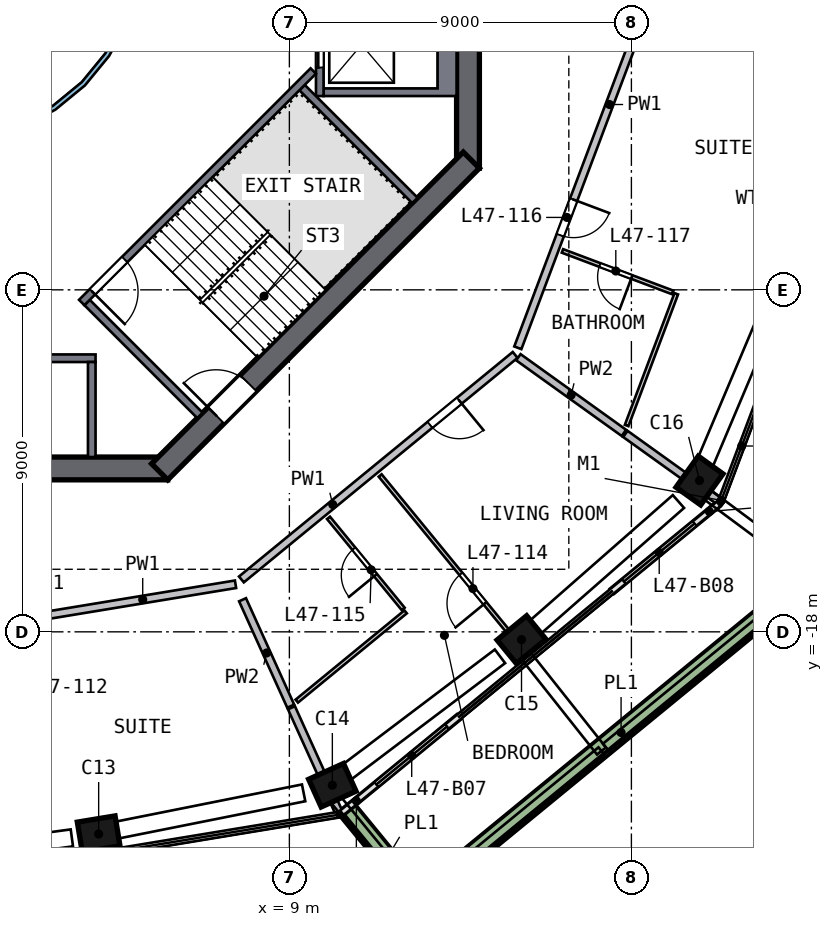
"""IFC4 building model, lengths in metres.
Left out: names, types, materials, properties, quantities, classifications, styles, units other than length and angle.
Written with IfcOpenShell. Run it as: python <this file> out.ifc"""

import sys

from ifc_helpers import new_model, si_unit, direction, frame, frame_2d, origin, origin_2d, place, context, subcontext, project, spatial, polyline, rectangle, outline, extrude, element, fill, save


model = new_model("IFC4")
c1 = context("Model", 3, precision=1e-05, world=origin(), true_north=direction((0.0, 1.0)))
c2 = subcontext(c1, "Body", "Model", "MODEL_VIEW")
j1 = project(units=[si_unit("LENGTHUNIT", "METRE"), si_unit("PLANEANGLEUNIT", "RADIAN")], contexts=[c1])
p1 = place(None, origin())
s1 = spatial("IfcSite", under=j1, at=p1, CompositionType="ELEMENT")
p2 = place(p1, origin())
s2 = spatial("IfcBuilding", under=s1, at=p2, CompositionType="ELEMENT")
p3 = place(p2, frame((0.0, 0.0, 194.0)))
s3 = spatial("IfcBuildingStorey", under=s2, at=p3, CompositionType="ELEMENT", Elevation=194.0)
p4 = place(p3, frame((3.848, -23.343, 0.0), z_axis=(0.110878491, 0.019240232, 0.993647711), x_axis=(0.980424155, 0.161570885, -0.112531444)))
e1 = element("IfcColumn", 1, at=p4, inside=s3, PredefinedType="COLUMN", context=c2, shape_type="SweptSolid", body=[
    extrude(rectangle(XDim=1.0, YDim=0.8, at=origin_2d()), origin(), (0.0, 0.0, 1.0), 3.21),
])
p5 = place(p3, frame((10.004, -22.095, 0.0), z_axis=(0.104684253, 0.048502944, 0.993322038), x_axis=(-0.904795347, -0.409920721, 0.115370627)))
e2 = element("IfcColumn", 2, at=p5, inside=s3, PredefinedType="COLUMN", context=c2, shape_type="SweptSolid", body=[
    extrude(rectangle(XDim=1.0, YDim=0.8, at=origin_2d()), origin(), (0.0, 0.0, 1.0), 3.211),
])
p6 = place(p3, frame((15.004, -18.292, 0.0), z_axis=(0.086391066, 0.072093953, 0.993649357), x_axis=(0.768277159, 0.630150897, -0.112516907)))
e3 = element("IfcColumn", 3, at=p6, inside=s3, PredefinedType="COLUMN", context=c2, shape_type="SweptSolid", body=[
    extrude(rectangle(XDim=1.0, YDim=0.8, at=origin_2d()), origin(), (0.0, 0.0, 1.0), 3.21),
])
p7 = place(p3, frame((19.712, -14.133, 0.0), z_axis=(0.066444321, 0.094344854, 0.993319788), x_axis=(-0.578831594, -0.807241683, 0.11539)))
e4 = element("IfcColumn", 4, at=p7, inside=s3, PredefinedType="COLUMN", context=c2, shape_type="SweptSolid", body=[
    extrude(rectangle(XDim=1.0, YDim=0.8, at=origin_2d()), origin(), (0.0, 0.0, 1.0), 3.211),
])
p8 = place(p3, frame((13.7, -5.799, 0.0), z_axis=(0.0, 0.0, 1.0), x_axis=(0.0, 1.0, 0.0)))
e5 = element("IfcWall", 5, at=p8, inside=s3, PredefinedType="SHEAR", context=c2, shape_type="SweptSolid", body=[
    extrude(rectangle(XDim=11.598, YDim=0.6, at=frame_2d((5.799, 0.0))), origin(), (0.0, 0.0, 1.0), 3.5),
])
p9 = place(p8, frame((4.899, 0.0, 0.0)))
e6 = element("IfcOpeningElement", 6, at=p9, cuts=e5, PredefinedType="OPENING", context=c2, shape_type="SweptSolid", body=[
    extrude(rectangle(XDim=1.8, YDim=2.1, at=frame_2d((0.9, 1.05))), frame((0.0, 0.31, 0.0), z_axis=(0.0, -1.0, 0.0), x_axis=(1.0, 0.0, 0.0)), (0.0, 0.0, 1.0), 0.62),
])
p10 = place(p3, frame((-5.799, -13.7, 0.0), z_axis=(0.0, 0.0, 1.0), x_axis=(1.0, 0.0, 0.0)))
e7 = element("IfcWall", 7, at=p10, inside=s3, PredefinedType="SHEAR", context=c2, shape_type="SweptSolid", body=[
    extrude(rectangle(XDim=11.598, YDim=0.6, at=frame_2d((5.799, 0.0))), origin(), (0.0, 0.0, 1.0), 3.5),
])
p11 = place(p3, frame((5.587, -13.788, 0.0), z_axis=(0.0, 0.0, 1.0), x_axis=(0.707106781, 0.707106781, 0.0)))
e8 = element("IfcWall", 8, at=p11, inside=s3, PredefinedType="SHEAR", context=c2, shape_type="SweptSolid", body=[
    extrude(rectangle(XDim=11.598, YDim=0.6, at=frame_2d((5.799, 0.0))), origin(), (0.0, 0.0, 1.0), 3.5),
])
p12 = place(p11, frame((2.099, 0.0, 0.0)))
e9 = element("IfcOpeningElement", 9, at=p12, cuts=e8, PredefinedType="OPENING", context=c2, shape_type="SweptSolid", body=[
    extrude(rectangle(XDim=1.2, YDim=2.1, at=frame_2d((0.6, 1.05))), frame((0.0, 0.31, 0.0), z_axis=(0.0, -1.0, 0.0), x_axis=(1.0, 0.0, 0.0)), (0.0, 0.0, 1.0), 0.62),
])
p13 = place(p3, frame((10.389, -22.757, 0.0), z_axis=(0.0, 0.0, 1.0), x_axis=(0.773191746, 0.634172314, 0.0)))
e10 = element("IfcWall", 10, at=p13, inside=s3, PredefinedType="SOLIDWALL", context=c2, shape_type="SweptSolid", body=[
    extrude(rectangle(XDim=3.967, YDim=0.15, at=frame_2d((1.984, 0.0))), origin(), (0.0, 0.0, 1.0), 2.475),
])
p14 = place(p13, frame((1.167, 0.0, 0.0)))
e11 = element("IfcOpeningElement", 11, at=p14, cuts=e10, PredefinedType="OPENING", context=c2, shape_type="SweptSolid", body=[
    extrude(rectangle(XDim=2.4, YDim=2.4, at=frame_2d((1.2, 1.2))), frame((0.0, 0.085, 0.0), z_axis=(0.0, -1.0, 0.0), x_axis=(1.0, 0.0, 0.0)), (0.0, 0.0, 1.0), 0.17),
])
p15 = place(p3, frame((17.495, -16.928, 0.0), z_axis=(0.0, 0.0, 1.0), x_axis=(0.773166937, 0.634202561, 0.0)))
e12 = element("IfcWall", 12, at=p15, inside=s3, PredefinedType="SOLIDWALL", context=c2, shape_type="SweptSolid", body=[
    extrude(rectangle(XDim=3.609, YDim=0.15, at=frame_2d((1.804, 0.0))), origin(), (0.0, 0.0, 1.0), 2.475),
])
p16 = place(p15, frame((0.4, 0.0, 0.0)))
e13 = element("IfcOpeningElement", 13, at=p16, cuts=e12, PredefinedType="OPENING", context=c2, shape_type="SweptSolid", body=[
    extrude(rectangle(XDim=2.4, YDim=2.4, at=frame_2d((1.2, 1.2))), frame((0.0, 0.085, 0.0), z_axis=(0.0, -1.0, 0.0), x_axis=(1.0, 0.0, 0.0)), (0.0, 0.0, 1.0), 0.17),
])
p17 = place(p3, frame((10.553, -22.72, 0.0), z_axis=(0.0, 0.0, 1.0), x_axis=(0.634197315, -0.773171239, 0.0)))
e14 = element("IfcWall", 14, at=p17, inside=s3, PredefinedType="SOLIDWALL", context=c2, shape_type="SweptSolid", body=[
    extrude(rectangle(XDim=3.199, YDim=0.5, at=frame_2d((1.6, 0.0))), origin(), (0.0, 0.0, 1.0), 0.7),
])
p18 = place(p3, frame((12.616, -24.842, 0.0), z_axis=(0.0, 0.0, 1.0), x_axis=(0.773176896, 0.634190419, 0.0)))
e15 = element("IfcWall", 15, at=p18, inside=s3, PredefinedType="SOLIDWALL", context=c2, shape_type="SweptSolid", body=[
    extrude(rectangle(XDim=13.224, YDim=0.5, at=frame_2d((6.612, 0.0))), origin(), (0.0, 0.0, 1.0), 0.7),
])
p19 = place(p3, origin())
e16 = element("IfcWall", 16, at=p19, inside=s3, PredefinedType="SOLIDWALL", context=c2, shape_type="SweptSolid", body=[
    extrude(outline(polyline([(13.4, -3.9), (9.9, -3.9), (9.9, -3.7), (12.9, -3.7), (12.9, -1.4), (9.9, -1.4), (9.9, -1.2), (13.4, -1.2), (13.4, -3.9)])), origin(), (0.0, 0.0, 1.0), 3.19),
])
p20 = place(p3, frame((9.8, -1.2, 0.0), z_axis=(0.0, 0.0, 1.0), x_axis=(0.0, -1.0, 0.0)))
e17 = element("IfcWall", 17, at=p20, inside=s3, PredefinedType="SOLIDWALL", context=c2, shape_type="SweptSolid", body=[
    extrude(rectangle(XDim=2.7, YDim=0.2, at=frame_2d((1.35, 0.0))), origin(), (0.0, 0.0, 1.0), 3.19),
])
p21 = place(p20, frame((0.75, 0.0, 0.0)))
e18 = element("IfcOpeningElement", 18, at=p21, cuts=e17, PredefinedType="OPENING", context=c2, shape_type="SweptSolid", body=[
    extrude(rectangle(XDim=1.2, YDim=2.1, at=frame_2d((0.6, 1.05))), frame((0.0, 0.11, 0.0), z_axis=(0.0, -1.0, 0.0), x_axis=(1.0, 0.0, 0.0)), (0.0, 0.0, 1.0), 0.22),
])
p22 = place(p3, frame((-3.9, -10.8, 0.0), z_axis=(0.0, 0.0, 1.0), x_axis=(1.0, 0.0, 0.0)))
e19 = element("IfcWall", 19, at=p22, inside=s3, PredefinedType="SOLIDWALL", context=c2, shape_type="SweptSolid", body=[
    extrude(rectangle(XDim=7.8, YDim=0.2, at=frame_2d((3.9, 0.0))), origin(), (0.0, 0.0, 1.0), 3.19),
])
p23 = place(p22, frame((3.45, 0.0, 0.0)))
e20 = element("IfcOpeningElement", 20, at=p23, cuts=e19, PredefinedType="OPENING", context=c2, shape_type="SweptSolid", body=[
    extrude(rectangle(XDim=0.9, YDim=2.1, at=frame_2d((0.45, 1.05))), frame((0.0, 0.11, 0.0), z_axis=(0.0, -1.0, 0.0), x_axis=(1.0, 0.0, 0.0)), (0.0, 0.0, 1.0), 0.22),
])
p24 = place(p3, frame((3.8, -10.9, 0.0), z_axis=(0.0, 0.0, 1.0), x_axis=(0.0, -1.0, 0.0)))
e21 = element("IfcWall", 21, at=p24, inside=s3, PredefinedType="SOLIDWALL", context=c2, shape_type="SweptSolid", body=[
    extrude(rectangle(XDim=2.5, YDim=0.2, at=frame_2d((1.25, 0.0))), origin(), (0.0, 0.0, 1.0), 3.19),
])
p25 = place(p3, frame((9.629, -3.24, 0.0), z_axis=(0.0, 0.0, 1.0), x_axis=(-0.707120946, -0.707092617, 0.0)))
e22 = element("IfcWall", 22, at=p25, inside=s3, PredefinedType="SOLIDWALL", context=c2, shape_type="SweptSolid", body=[
    extrude(rectangle(XDim=8.618, YDim=0.2, at=frame_2d((4.309, 0.0))), origin(), (0.0, 0.0, 1.0), 3.19),
])
p26 = place(p25, frame((7.018, 0.0, 0.0)))
e23 = element("IfcOpeningElement", 23, at=p26, cuts=e22, PredefinedType="OPENING", context=c2, shape_type="SweptSolid", body=[
    extrude(rectangle(XDim=1.2, YDim=2.1, at=frame_2d((0.6, 1.05))), frame((0.0, 0.11, 0.0), z_axis=(0.0, -1.0, 0.0), x_axis=(1.0, 0.0, 0.0)), (0.0, 0.0, 1.0), 0.22),
])
for number, where, z_axis, x_axis in (
    (24, (3.677, -9.334, 0.0), (0.0, 0.0, 1.0), (0.707, -0.707, 0.0)),
    (25, (9.334, -3.677, 0.0), (0.0, 0.0, 1.0), (0.707, -0.707, 0.0)),
):
    element("IfcWall", number, at=place(p3, frame(where, z_axis=z_axis, x_axis=x_axis)), inside=s3, PredefinedType="SOLIDWALL", context=c2, shape_type="SweptSolid", body=[
        extrude(rectangle(XDim=4.2, YDim=0.2, at=frame_2d((2.1, 0.0))), origin(), (0.0, 0.0, 1.0), 3.19),
    ])
p27 = place(p3, origin())
e26 = element("IfcWall", 26, at=p27, inside=s3, PredefinedType="SOLIDWALL", context=c2, shape_type="SweptSolid", body=[
    extrude(outline(polyline([(5.021, -0.999), (4.73, -1.959), (4.257, -2.844), (3.62, -3.62), (2.844, -4.257), (1.959, -4.73), (0.999, -5.021), (0.0, -5.12), (-0.999, -5.021), (-1.959, -4.73), (-2.844, -4.257), (-3.62, -3.62), (-4.257, -2.844), (-4.73, -1.959), (-5.021, -0.999), (-5.12, 0.0), (-5.021, 0.999), (-4.73, 1.959), (-4.257, 2.844), (-3.62, 3.62), (-2.844, 4.257), (-1.959, 4.73), (-0.999, 5.021), (0.0, 5.12), (0.999, 5.021), (1.959, 4.73), (2.844, 4.257), (3.62, 3.62), (4.257, 2.844), (4.73, 1.959), (5.021, 0.999), (5.12, 0.0), (5.021, -0.999)]), holes=[polyline([(4.904, 0.976), (4.619, 1.913), (4.157, 2.778), (3.535, 3.535), (2.778, 4.157), (1.913, 4.619), (0.976, 4.904), (0.0, 5.0), (-0.976, 4.904), (-1.913, 4.619), (-2.778, 4.157), (-3.535, 3.535), (-4.157, 2.778), (-4.619, 1.913), (-4.904, 0.976), (-5.0, 0.0), (-4.904, -0.976), (-4.619, -1.913), (-4.157, -2.778), (-3.535, -3.535), (-2.778, -4.157), (-1.913, -4.619), (-0.976, -4.904), (0.0, -5.0), (0.976, -4.904), (1.913, -4.619), (2.778, -4.157), (3.535, -3.535), (4.157, -2.778), (4.619, -1.913), (4.904, -0.976), (5.0, 0.0), (4.904, 0.976)])]), origin(), (0.0, 0.0, 1.0), 3.19),
])
p28 = place(p3, frame((7.583, -16.748, 0.0), z_axis=(0.0, 0.0, 1.0), x_axis=(-0.986686974, -0.162630919, 0.0)))
e27 = element("IfcWall", 27, at=p28, inside=s3, PredefinedType="SOLIDWALL", context=c2, shape_type="SweptSolid", body=[
    extrude(rectangle(XDim=9.316, YDim=0.2, at=frame_2d((4.658, 0.0))), origin(), (0.0, 0.0, 1.0), 3.19),
])
p29 = place(p28, frame((5.15, 0.0, 0.0)))
e28 = element("IfcOpeningElement", 28, at=p29, cuts=e27, PredefinedType="OPENING", context=c2, shape_type="SweptSolid", body=[
    extrude(rectangle(XDim=1.0, YDim=2.1, at=frame_2d((0.5, 1.05))), frame((0.0, 0.11, 0.0), z_axis=(0.0, -1.0, 0.0), x_axis=(1.0, 0.0, 0.0)), (0.0, 0.0, 1.0), 0.22),
])
p30 = place(p3, frame((14.941, -10.713, 0.0), z_axis=(0.0, 0.0, 1.0), x_axis=(-0.773179127, -0.634187699, 0.0)))
e29 = element("IfcWall", 29, at=p30, inside=s3, PredefinedType="SOLIDWALL", context=c2, shape_type="SweptSolid", body=[
    extrude(rectangle(XDim=9.317, YDim=0.2, at=frame_2d((4.658, 0.0))), origin(), (0.0, 0.0, 1.0), 3.19),
])
p31 = place(p30, frame((1.9, 0.0, 0.0)))
e30 = element("IfcOpeningElement", 30, at=p31, cuts=e29, PredefinedType="OPENING", context=c2, shape_type="SweptSolid", body=[
    extrude(rectangle(XDim=1.0, YDim=2.1, at=frame_2d((0.5, 1.05))), frame((0.0, 0.11, 0.0), z_axis=(0.0, -1.0, 0.0), x_axis=(1.0, 0.0, 0.0)), (0.0, 0.0, 1.0), 0.22),
])
p32 = place(p3, frame((18.296, -1.807, 0.0), z_axis=(0.0, 0.0, 1.0), x_axis=(-0.352510128, -0.935807998, 0.0)))
e31 = element("IfcWall", 31, at=p32, inside=s3, PredefinedType="SOLIDWALL", context=c2, shape_type="SweptSolid", body=[
    extrude(rectangle(XDim=9.317, YDim=0.2, at=frame_2d((4.658, 0.0))), origin(), (0.0, 0.0, 1.0), 3.19),
])
p33 = place(p32, frame((5.15, 0.0, 0.0)))
e32 = element("IfcOpeningElement", 32, at=p33, cuts=e31, PredefinedType="OPENING", context=c2, shape_type="SweptSolid", body=[
    extrude(rectangle(XDim=1.0, YDim=2.1, at=frame_2d((0.5, 1.05))), frame((0.0, 0.11, 0.0), z_axis=(0.0, -1.0, 0.0), x_axis=(1.0, 0.0, 0.0)), (0.0, 0.0, 1.0), 0.22),
])
p34 = place(p3, frame((7.768, -17.156, 0.0), z_axis=(0.0, 0.0, 1.0), x_axis=(0.412516256, -0.910950239, 0.0)))
e33 = element("IfcWall", 33, at=p34, inside=s3, PredefinedType="SOLIDWALL", context=c2, shape_type="SweptSolid", body=[
    extrude(rectangle(XDim=3.074, YDim=0.2, at=frame_2d((1.537, 0.0))), origin(), (0.0, 0.0, 1.0), 3.19),
])
p35 = place(p3, frame((9.055, -19.998, 0.0), z_axis=(0.0, 0.0, 1.0), x_axis=(0.412507553, -0.91095418, 0.0)))
e34 = element("IfcWall", 34, at=p35, inside=s3, PredefinedType="SOLIDWALL", context=c2, shape_type="SweptSolid", body=[
    extrude(rectangle(XDim=3.011, YDim=0.2, at=frame_2d((1.506, 0.0))), origin(), (0.0, 0.0, 1.0), 3.19),
])
p36 = place(p3, frame((15.025, -10.773, 0.0), z_axis=(0.0, 0.0, 1.0), x_axis=(0.812680152, -0.582710023, 0.0)))
e35 = element("IfcWall", 35, at=p36, inside=s3, PredefinedType="SOLIDWALL", context=c2, shape_type="SweptSolid", body=[
    extrude(rectangle(XDim=3.418, YDim=0.2, at=frame_2d((1.709, 0.0))), origin(), (0.0, 0.0, 1.0), 3.19),
])
p37 = place(p3, frame((17.841, -12.792, 0.0), z_axis=(0.0, 0.0, 1.0), x_axis=(0.812658436, -0.582740307, 0.0)))
e36 = element("IfcWall", 36, at=p37, inside=s3, PredefinedType="SOLIDWALL", context=c2, shape_type="SweptSolid", body=[
    extrude(rectangle(XDim=3.011, YDim=0.2, at=frame_2d((1.506, 0.0))), origin(), (0.0, 0.0, 1.0), 3.19),
])
p38 = place(p3, frame((9.195, -19.823, 0.0), z_axis=(0.0, 0.0, 1.0), x_axis=(0.773157898, 0.63421358, 0.0)))
e37 = element("IfcWall", 37, at=p38, inside=s3, PredefinedType="PARTITIONING", context=c2, shape_type="SweptSolid", body=[
    extrude(rectangle(XDim=3.704, YDim=0.1, at=frame_2d((1.852, 0.0))), origin(), (0.0, 0.0, 1.0), 3.19),
])
p39 = place(p3, frame((11.996, -17.397, 0.0), z_axis=(0.0, 0.0, 1.0), x_axis=(-0.634185061, 0.77318129, 0.0)))
e38 = element("IfcWall", 38, at=p39, inside=s3, PredefinedType="PARTITIONING", context=c2, shape_type="SweptSolid", body=[
    extrude(rectangle(XDim=3.1, YDim=0.1, at=frame_2d((1.55, 0.0))), origin(), (0.0, 0.0, 1.0), 3.19),
])
p40 = place(p39, frame((1.15, 0.0, 0.0)))
e39 = element("IfcOpeningElement", 39, at=p40, cuts=e38, PredefinedType="OPENING", context=c2, shape_type="SweptSolid", body=[
    extrude(rectangle(XDim=0.9, YDim=2.1, at=frame_2d((0.45, 1.05))), frame((0.0, 0.06, 0.0), z_axis=(0.0, -1.0, 0.0), x_axis=(1.0, 0.0, 0.0)), (0.0, 0.0, 1.0), 0.12),
])
p41 = place(p3, frame((15.289, -18.64, 0.0), z_axis=(0.0, 0.0, 1.0), x_axis=(-0.634214405, 0.773157221, 0.0)))
e40 = element("IfcWall", 40, at=p41, inside=s3, PredefinedType="PARTITIONING", context=c2, shape_type="SweptSolid", body=[
    extrude(rectangle(XDim=6.15, YDim=0.1, at=frame_2d((3.075, 0.0))), origin(), (0.0, 0.0, 1.0), 3.19),
])
p42 = place(p41, frame((1.8, 0.0, 0.0)))
e41 = element("IfcOpeningElement", 41, at=p42, cuts=e40, PredefinedType="OPENING", context=c2, shape_type="SweptSolid", body=[
    extrude(rectangle(XDim=1.0, YDim=2.1, at=frame_2d((0.5, 1.05))), frame((0.0, 0.06, 0.0), z_axis=(0.0, -1.0, 0.0), x_axis=(1.0, 0.0, 0.0)), (0.0, 0.0, 1.0), 0.12),
])
p43 = place(p3, frame((19.087, -9.068, 0.0), z_axis=(0.0, 0.0, 1.0), x_axis=(-0.935813585, 0.352495296, 0.0)))
e42 = element("IfcWall", 42, at=p43, inside=s3, PredefinedType="PARTITIONING", context=c2, shape_type="SweptSolid", body=[
    extrude(rectangle(XDim=3.1, YDim=0.1, at=frame_2d((1.55, 0.0))), origin(), (0.0, 0.0, 1.0), 3.19),
])
p44 = place(p43, frame((1.15, 0.0, 0.0)))
e43 = element("IfcOpeningElement", 43, at=p44, cuts=e42, PredefinedType="OPENING", context=c2, shape_type="SweptSolid", body=[
    extrude(rectangle(XDim=0.9, YDim=2.1, at=frame_2d((0.45, 1.05))), frame((0.0, 0.06, 0.0), z_axis=(0.0, -1.0, 0.0), x_axis=(1.0, 0.0, 0.0)), (0.0, 0.0, 1.0), 0.12),
])
p45 = place(p3, frame((19.18, -9.104, 0.0), z_axis=(0.0, 0.0, 1.0), x_axis=(-0.352517215, -0.935805329, 0.0)))
e44 = element("IfcWall", 44, at=p45, inside=s3, PredefinedType="PARTITIONING", context=c2, shape_type="SweptSolid", body=[
    extrude(rectangle(XDim=3.704, YDim=0.1, at=frame_2d((1.852, 0.0))), origin(), (0.0, 0.0, 1.0), 3.19),
])
p46 = place(p14, origin())
e45 = element("IfcDoor", 45, at=p46, inside=s3, OperationType="SLIDING_TO_LEFT", PredefinedType="DOOR", context=c2, shape_type="SweptSolid", body=[
    extrude(rectangle(XDim=2.4, YDim=2.4, at=frame_2d((1.2, 1.2))), frame((0.0, 0.025, 0.0), z_axis=(0.0, -1.0, 0.0), x_axis=(1.0, 0.0, 0.0)), (0.0, 0.0, 1.0), 0.05),
])
fill(e11, e45)
p47 = place(p16, origin())
e46 = element("IfcDoor", 46, at=p47, inside=s3, OperationType="SLIDING_TO_RIGHT", PredefinedType="DOOR", context=c2, shape_type="SweptSolid", body=[
    extrude(rectangle(XDim=2.4, YDim=2.4, at=frame_2d((1.2, 1.2))), frame((0.0, 0.025, 0.0), z_axis=(0.0, -1.0, 0.0), x_axis=(1.0, 0.0, 0.0)), (0.0, 0.0, 1.0), 0.05),
])
fill(e13, e46)
p48 = place(p21, origin())
e47 = element("IfcDoor", 47, at=p48, inside=s3, OperationType="DOUBLE_DOOR_SLIDING", PredefinedType="DOOR", context=c2, shape_type="SweptSolid", body=[
    extrude(rectangle(XDim=1.2, YDim=2.1, at=frame_2d((0.6, 1.05))), frame((0.0, 0.025, 0.0), z_axis=(0.0, -1.0, 0.0), x_axis=(1.0, 0.0, 0.0)), (0.0, 0.0, 1.0), 0.05),
])
fill(e18, e47)
p49 = place(p26, origin())
e48 = element("IfcDoor", 48, at=p49, inside=s3, OperationType="SINGLE_SWING_RIGHT", PredefinedType="DOOR", context=c2, shape_type="SweptSolid", body=[
    extrude(rectangle(XDim=1.2, YDim=2.1, at=frame_2d((0.6, 1.05))), frame((0.0, 0.025, 0.0), z_axis=(0.0, -1.0, 0.0), x_axis=(1.0, 0.0, 0.0)), (0.0, 0.0, 1.0), 0.05),
])
fill(e23, e48)
p50 = place(p12, origin())
e49 = element("IfcDoor", 49, at=p50, inside=s3, OperationType="SINGLE_SWING_LEFT", PredefinedType="DOOR", context=c2, shape_type="SweptSolid", body=[
    extrude(rectangle(XDim=1.2, YDim=2.1, at=frame_2d((0.6, 1.05))), frame((0.0, 0.025, 0.0), z_axis=(0.0, -1.0, 0.0), x_axis=(1.0, 0.0, 0.0)), (0.0, 0.0, 1.0), 0.05),
])
fill(e9, e49)
p51 = place(p31, origin())
e50 = element("IfcDoor", 50, at=p51, inside=s3, OperationType="SINGLE_SWING_LEFT", PredefinedType="DOOR", context=c2, shape_type="SweptSolid", body=[
    extrude(rectangle(XDim=1.0, YDim=2.1, at=frame_2d((0.5, 1.05))), frame((0.0, 0.025, 0.0), z_axis=(0.0, -1.0, 0.0), x_axis=(1.0, 0.0, 0.0)), (0.0, 0.0, 1.0), 0.05),
])
fill(e30, e50)
p52 = place(p42, origin())
e51 = element("IfcDoor", 51, at=p52, inside=s3, OperationType="SINGLE_SWING_LEFT", PredefinedType="DOOR", context=c2, shape_type="SweptSolid", body=[
    extrude(rectangle(XDim=1.0, YDim=2.1, at=frame_2d((0.5, 1.05))), frame((0.0, 0.025, 0.0), z_axis=(0.0, -1.0, 0.0), x_axis=(1.0, 0.0, 0.0)), (0.0, 0.0, 1.0), 0.05),
])
fill(e41, e51)
p53 = place(p40, origin())
e52 = element("IfcDoor", 52, at=p53, inside=s3, OperationType="SINGLE_SWING_LEFT", PredefinedType="DOOR", context=c2, shape_type="SweptSolid", body=[
    extrude(rectangle(XDim=0.9, YDim=2.1, at=frame_2d((0.45, 1.05))), frame((0.0, 0.025, 0.0), z_axis=(0.0, -1.0, 0.0), x_axis=(1.0, 0.0, 0.0)), (0.0, 0.0, 1.0), 0.05),
])
fill(e39, e52)
p54 = place(p33, origin())
e53 = element("IfcDoor", 53, at=p54, inside=s3, OperationType="SINGLE_SWING_LEFT", PredefinedType="DOOR", context=c2, shape_type="SweptSolid", body=[
    extrude(rectangle(XDim=1.0, YDim=2.1, at=frame_2d((0.5, 1.05))), frame((0.0, 0.025, 0.0), z_axis=(0.0, -1.0, 0.0), x_axis=(1.0, 0.0, 0.0)), (0.0, 0.0, 1.0), 0.05),
])
fill(e32, e53)
p55 = place(p44, origin())
e54 = element("IfcDoor", 54, at=p55, inside=s3, OperationType="SINGLE_SWING_LEFT", PredefinedType="DOOR", context=c2, shape_type="SweptSolid", body=[
    extrude(rectangle(XDim=0.9, YDim=2.1, at=frame_2d((0.45, 1.05))), frame((0.0, 0.025, 0.0), z_axis=(0.0, -1.0, 0.0), x_axis=(1.0, 0.0, 0.0)), (0.0, 0.0, 1.0), 0.05),
])
fill(e43, e54)
save(model, sys.argv[1])
